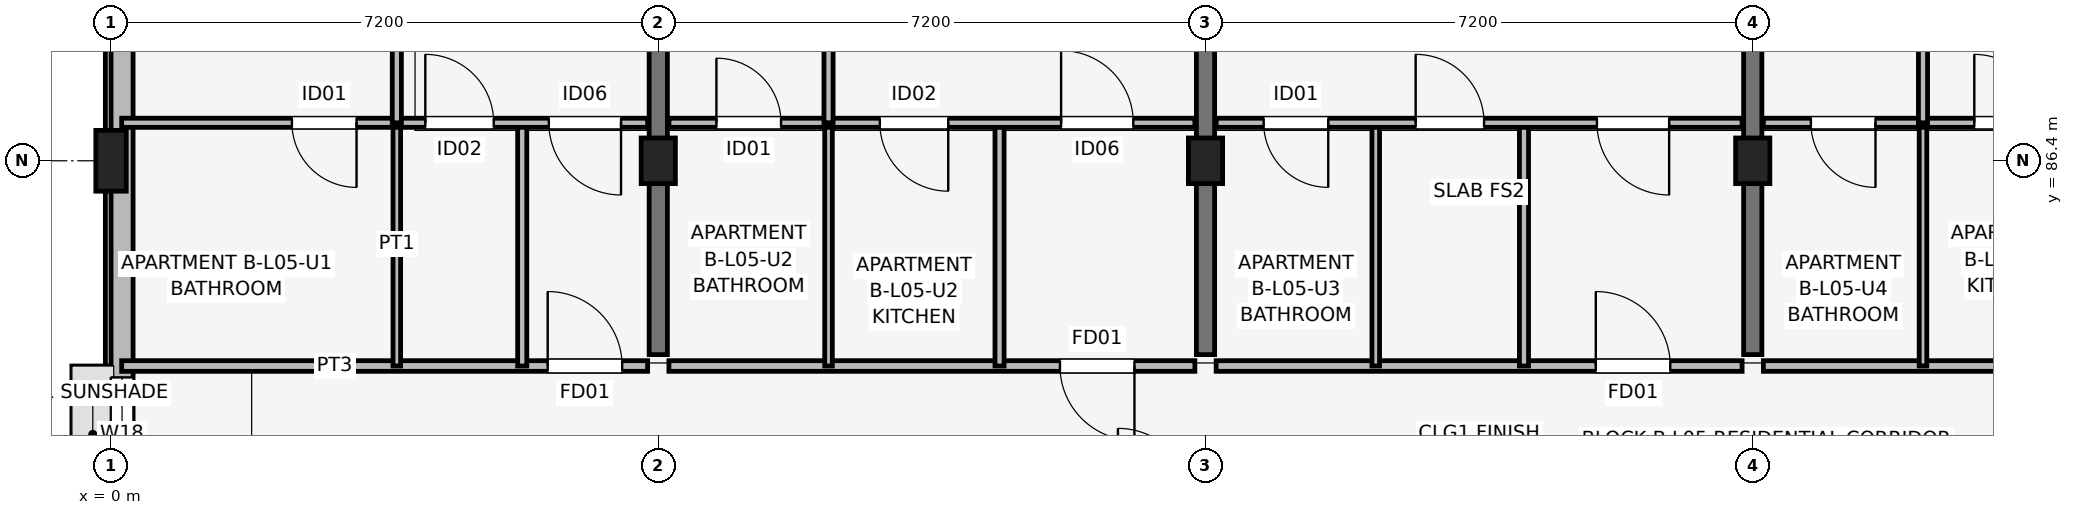
"""IFC4 building model, lengths in metres.
Left out: names, types, materials, properties, quantities, classifications, styles, units other than length and angle.
Written with IfcOpenShell. Run it as: python <this file> out.ifc"""

import sys

from ifc_helpers import new_model, si_unit, direction, frame, frame_2d, origin, origin_2d, place, context, subcontext, project, spatial, rectangle, extrude, element, fill, save


model = new_model("IFC4")
c1 = context("Model", 3, precision=1e-05, world=origin(), true_north=direction((0.0, 1.0)))
c2 = subcontext(c1, "Body", "Model", "MODEL_VIEW")
j1 = project(units=[si_unit("LENGTHUNIT", "METRE"), si_unit("PLANEANGLEUNIT", "RADIAN")], contexts=[c1])
p1 = place(None, origin())
s1 = spatial("IfcSite", under=j1, at=p1, CompositionType="ELEMENT")
p2 = place(p1, origin())
s2 = spatial("IfcBuilding", under=s1, at=p2, CompositionType="ELEMENT")
p3 = place(p2, frame((0.0, 0.0, 18.15)))
s3 = spatial("IfcBuildingStorey", under=s2, at=p3, CompositionType="ELEMENT", Elevation=18.15)
p4 = place(p3, frame((0.0, 86.4, 0.0), z_axis=(0.0, 0.0, 1.0), x_axis=(1.0, 0.0, 0.0)))
e1 = element("IfcColumn", 1, at=p4, inside=s3, PredefinedType="COLUMN", context=c2, shape_type="SweptSolid", body=[
    extrude(rectangle(XDim=0.4, YDim=0.8, at=origin_2d()), origin(), (0.0, 0.0, 1.0), 3.15),
])
for number, where, z_axis, x_axis in (
    (2, (7.2, 86.4, 0.0), (0.0, 0.0, 1.0), (1.0, 0.0, 0.0)),
    (3, (14.4, 86.4, 0.0), (0.0, 0.0, 1.0), (1.0, 0.0, 0.0)),
    (4, (21.6, 86.4, 0.0), (0.0, 0.0, 1.0), (1.0, 0.0, 0.0)),
):
    element("IfcColumn", number, at=place(p3, frame(where, z_axis=z_axis, x_axis=x_axis)), inside=s3, PredefinedType="COLUMN", context=c2, shape_type="SweptSolid", body=[
        extrude(rectangle(XDim=0.45, YDim=0.6, at=origin_2d()), origin(), (0.0, 0.0, 1.0), 3.15),
    ])
for number, where, z_axis, x_axis in (
    (5, (7.2, 83.85, 0.0), (0.0, 0.0, 1.0), (0.0, 1.0, 0.0)),
    (6, (14.4, 83.85, 0.0), (0.0, 0.0, 1.0), (0.0, 1.0, 0.0)),
    (7, (21.6, 83.85, 0.0), (0.0, 0.0, 1.0), (0.0, 1.0, 0.0)),
):
    element("IfcWall", number, at=place(p3, frame(where, z_axis=z_axis, x_axis=x_axis)), inside=s3, PredefinedType="SHEAR", context=c2, shape_type="SweptSolid", body=[
        extrude(rectangle(XDim=9.4, YDim=0.24, at=frame_2d((4.7, 0.0))), origin(), (0.0, 0.0, 1.0), 3.15),
    ])
p5 = place(p3, frame((0.145, 90.4, 0.0), z_axis=(0.0, 0.0, 1.0), x_axis=(0.0, -1.0, 0.0)))
e8 = element("IfcWall", 8, at=p5, inside=s3, PredefinedType="SOLIDWALL", context=c2, shape_type="SweptSolid", body=[
    extrude(rectangle(XDim=15.2, YDim=0.29, at=frame_2d((7.6, 0.0))), origin(), (0.0, 0.0, 1.0), 2.38),
])
p6 = place(p5, frame((6.85, 0.0, 1.05)))
e9 = element("IfcOpeningElement", 9, at=p6, cuts=e8, PredefinedType="OPENING", context=c2, shape_type="SweptSolid", body=[
    extrude(rectangle(XDim=1.5, YDim=1.15, at=frame_2d((0.75, 0.575))), frame((0.0, 0.155, 0.0), z_axis=(0.0, -1.0, 0.0), x_axis=(1.0, 0.0, 0.0)), (0.0, 0.0, 1.0), 0.31),
])
p7 = place(p5, frame((1.215, 0.0, 0.72)))
e10 = element("IfcOpeningElement", 10, at=p7, cuts=e8, PredefinedType="OPENING", context=c2, shape_type="SweptSolid", body=[
    extrude(rectangle(XDim=1.3, YDim=1.55, at=frame_2d((0.65, 0.775))), frame((0.0, 0.155, 0.0), z_axis=(0.0, -1.0, 0.0), x_axis=(1.0, 0.0, 0.0)), (0.0, 0.0, 1.0), 0.31),
])
p8 = place(p3, frame((0.14, 83.7, 0.0), z_axis=(0.0, 0.0, 1.0), x_axis=(1.0, 0.0, 0.0)))
e11 = element("IfcWall", 11, at=p8, inside=s3, PredefinedType="PARTITIONING", context=c2, shape_type="SweptSolid", body=[
    extrude(rectangle(XDim=6.92, YDim=0.14, at=frame_2d((3.46, 0.0))), origin(), (0.0, 0.0, 1.0), 2.38),
])
p9 = place(p8, frame((5.605, 0.0, 0.0)))
e12 = element("IfcOpeningElement", 12, at=p9, cuts=e11, PredefinedType="OPENING", context=c2, shape_type="SweptSolid", body=[
    extrude(rectangle(XDim=0.98, YDim=2.1, at=frame_2d((0.49, 1.05))), frame((0.0, 0.08, 0.0), z_axis=(0.0, -1.0, 0.0), x_axis=(1.0, 0.0, 0.0)), (0.0, 0.0, 1.0), 0.16),
])
p10 = place(p3, frame((3.76, 83.7, 0.0), z_axis=(0.0, 0.0, 1.0), x_axis=(0.0, 1.0, 0.0)))
e13 = element("IfcWall", 13, at=p10, inside=s3, PredefinedType="PARTITIONING", context=c2, shape_type="SweptSolid", body=[
    extrude(rectangle(XDim=3.2, YDim=0.1, at=frame_2d((1.6, 0.0))), origin(), (0.0, 0.0, 1.0), 2.375),
])
p11 = place(p3, frame((5.41, 83.7, 0.0), z_axis=(0.0, 0.0, 1.0), x_axis=(0.0, 1.0, 0.0)))
e14 = element("IfcWall", 14, at=p11, inside=s3, PredefinedType="PARTITIONING", context=c2, shape_type="SweptSolid", body=[
    extrude(rectangle(XDim=3.2, YDim=0.12, at=frame_2d((1.6, 0.0))), origin(), (0.0, 0.0, 1.0), 2.375),
])
p12 = place(p3, frame((0.14, 86.9, 0.0), z_axis=(0.0, 0.0, 1.0), x_axis=(1.0, 0.0, 0.0)))
e15 = element("IfcWall", 15, at=p12, inside=s3, PredefinedType="PARTITIONING", context=c2, shape_type="SweptSolid", body=[
    extrude(rectangle(XDim=6.92, YDim=0.12, at=frame_2d((3.46, 0.0))), origin(), (0.0, 0.0, 1.0), 2.38),
])
p13 = place(p12, frame((3.09, 0.0, 0.0), z_axis=(0.0, 0.0, 1.0), x_axis=(-1.0, 0.0, 0.0)))
e16 = element("IfcOpeningElement", 16, at=p13, cuts=e15, PredefinedType="OPENING", context=c2, shape_type="SweptSolid", body=[
    extrude(rectangle(XDim=0.85, YDim=2.08, at=frame_2d((0.425, 1.04))), frame((0.0, 0.07, 0.0), z_axis=(0.0, -1.0, 0.0), x_axis=(1.0, 0.0, 0.0)), (0.0, 0.0, 1.0), 0.14),
])
p14 = place(p12, frame((3.995, 0.0, 0.0)))
e17 = element("IfcOpeningElement", 17, at=p14, cuts=e15, PredefinedType="OPENING", context=c2, shape_type="SweptSolid", body=[
    extrude(rectangle(XDim=0.9, YDim=2.08, at=frame_2d((0.45, 1.04))), frame((0.0, 0.07, 0.0), z_axis=(0.0, -1.0, 0.0), x_axis=(1.0, 0.0, 0.0)), (0.0, 0.0, 1.0), 0.14),
])
p15 = place(p12, frame((6.57, 0.0, 0.0), z_axis=(0.0, 0.0, 1.0), x_axis=(-1.0, 0.0, 0.0)))
e18 = element("IfcOpeningElement", 18, at=p15, cuts=e15, PredefinedType="OPENING", context=c2, shape_type="SweptSolid", body=[
    extrude(rectangle(XDim=0.95, YDim=2.08, at=frame_2d((0.475, 1.04))), frame((0.0, 0.07, 0.0), z_axis=(0.0, -1.0, 0.0), x_axis=(1.0, 0.0, 0.0)), (0.0, 0.0, 1.0), 0.14),
])
p16 = place(p3, frame((3.76, 86.9, 0.0), z_axis=(0.0, 0.0, 1.0), x_axis=(0.0, 1.0, 0.0)))
e19 = element("IfcWall", 19, at=p16, inside=s3, PredefinedType="PARTITIONING", context=c2, shape_type="SweptSolid", body=[
    extrude(rectangle(XDim=6.4, YDim=0.12, at=frame_2d((3.2, 0.0))), origin(), (0.0, 0.0, 1.0), 2.38),
])
p17 = place(p16, frame((2.75, 0.0, 0.0)))
e20 = element("IfcOpeningElement", 20, at=p17, cuts=e19, PredefinedType="OPENING", context=c2, shape_type="SweptSolid", body=[
    extrude(rectangle(XDim=0.9, YDim=2.08, at=frame_2d((0.45, 1.04))), frame((0.0, 0.07, 0.0), z_axis=(0.0, -1.0, 0.0), x_axis=(1.0, 0.0, 0.0)), (0.0, 0.0, 1.0), 0.14),
])
p18 = place(p3, frame((7.34, 83.7, 0.0), z_axis=(0.0, 0.0, 1.0), x_axis=(1.0, 0.0, 0.0)))
e21 = element("IfcWall", 21, at=p18, inside=s3, PredefinedType="PARTITIONING", context=c2, shape_type="SweptSolid", body=[
    extrude(rectangle(XDim=6.92, YDim=0.14, at=frame_2d((3.46, 0.0))), origin(), (0.0, 0.0, 1.0), 2.38),
])
p19 = place(p18, frame((6.125, 0.0, 0.0), z_axis=(0.0, 0.0, 1.0), x_axis=(-1.0, 0.0, 0.0)))
e22 = element("IfcOpeningElement", 22, at=p19, cuts=e21, PredefinedType="OPENING", context=c2, shape_type="SweptSolid", body=[
    extrude(rectangle(XDim=0.98, YDim=2.1, at=frame_2d((0.49, 1.05))), frame((0.0, 0.08, 0.0), z_axis=(0.0, -1.0, 0.0), x_axis=(1.0, 0.0, 0.0)), (0.0, 0.0, 1.0), 0.16),
])
p20 = place(p3, frame((9.44, 83.7, 0.0), z_axis=(0.0, 0.0, 1.0), x_axis=(0.0, 1.0, 0.0)))
e23 = element("IfcWall", 23, at=p20, inside=s3, PredefinedType="PARTITIONING", context=c2, shape_type="SweptSolid", body=[
    extrude(rectangle(XDim=3.2, YDim=0.1, at=frame_2d((1.6, 0.0))), origin(), (0.0, 0.0, 1.0), 2.375),
])
p21 = place(p3, frame((11.69, 83.7, 0.0), z_axis=(0.0, 0.0, 1.0), x_axis=(0.0, 1.0, 0.0)))
e24 = element("IfcWall", 24, at=p21, inside=s3, PredefinedType="PARTITIONING", context=c2, shape_type="SweptSolid", body=[
    extrude(rectangle(XDim=3.2, YDim=0.12, at=frame_2d((1.6, 0.0))), origin(), (0.0, 0.0, 1.0), 2.375),
])
p22 = place(p3, frame((7.34, 86.9, 0.0), z_axis=(0.0, 0.0, 1.0), x_axis=(1.0, 0.0, 0.0)))
e25 = element("IfcWall", 25, at=p22, inside=s3, PredefinedType="PARTITIONING", context=c2, shape_type="SweptSolid", body=[
    extrude(rectangle(XDim=6.92, YDim=0.12, at=frame_2d((3.46, 0.0))), origin(), (0.0, 0.0, 1.0), 2.38),
])
p23 = place(p22, frame((0.625, 0.0, 0.0)))
e26 = element("IfcOpeningElement", 26, at=p23, cuts=e25, PredefinedType="OPENING", context=c2, shape_type="SweptSolid", body=[
    extrude(rectangle(XDim=0.85, YDim=2.08, at=frame_2d((0.425, 1.04))), frame((0.0, 0.07, 0.0), z_axis=(0.0, -1.0, 0.0), x_axis=(1.0, 0.0, 0.0)), (0.0, 0.0, 1.0), 0.14),
])
p24 = place(p22, frame((3.675, 0.0, 0.0), z_axis=(0.0, 0.0, 1.0), x_axis=(-1.0, 0.0, 0.0)))
e27 = element("IfcOpeningElement", 27, at=p24, cuts=e25, PredefinedType="OPENING", context=c2, shape_type="SweptSolid", body=[
    extrude(rectangle(XDim=0.9, YDim=2.08, at=frame_2d((0.45, 1.04))), frame((0.0, 0.07, 0.0), z_axis=(0.0, -1.0, 0.0), x_axis=(1.0, 0.0, 0.0)), (0.0, 0.0, 1.0), 0.14),
])
p25 = place(p22, frame((5.16, 0.0, 0.0)))
e28 = element("IfcOpeningElement", 28, at=p25, cuts=e25, PredefinedType="OPENING", context=c2, shape_type="SweptSolid", body=[
    extrude(rectangle(XDim=0.95, YDim=2.08, at=frame_2d((0.475, 1.04))), frame((0.0, 0.07, 0.0), z_axis=(0.0, -1.0, 0.0), x_axis=(1.0, 0.0, 0.0)), (0.0, 0.0, 1.0), 0.14),
])
p26 = place(p3, frame((9.44, 86.9, 0.0), z_axis=(0.0, 0.0, 1.0), x_axis=(0.0, 1.0, 0.0)))
e29 = element("IfcWall", 29, at=p26, inside=s3, PredefinedType="PARTITIONING", context=c2, shape_type="SweptSolid", body=[
    extrude(rectangle(XDim=6.4, YDim=0.12, at=frame_2d((3.2, 0.0))), origin(), (0.0, 0.0, 1.0), 2.38),
])
p27 = place(p26, frame((3.65, 0.0, 0.0), z_axis=(0.0, 0.0, 1.0), x_axis=(-1.0, 0.0, 0.0)))
e30 = element("IfcOpeningElement", 30, at=p27, cuts=e29, PredefinedType="OPENING", context=c2, shape_type="SweptSolid", body=[
    extrude(rectangle(XDim=0.9, YDim=2.08, at=frame_2d((0.45, 1.04))), frame((0.0, 0.07, 0.0), z_axis=(0.0, -1.0, 0.0), x_axis=(1.0, 0.0, 0.0)), (0.0, 0.0, 1.0), 0.14),
])
p28 = place(p3, frame((14.54, 83.7, 0.0), z_axis=(0.0, 0.0, 1.0), x_axis=(1.0, 0.0, 0.0)))
e31 = element("IfcWall", 31, at=p28, inside=s3, PredefinedType="PARTITIONING", context=c2, shape_type="SweptSolid", body=[
    extrude(rectangle(XDim=6.92, YDim=0.14, at=frame_2d((3.46, 0.0))), origin(), (0.0, 0.0, 1.0), 2.38),
])
p29 = place(p28, frame((4.995, 0.0, 0.0)))
e32 = element("IfcOpeningElement", 32, at=p29, cuts=e31, PredefinedType="OPENING", context=c2, shape_type="SweptSolid", body=[
    extrude(rectangle(XDim=0.98, YDim=2.1, at=frame_2d((0.49, 1.05))), frame((0.0, 0.08, 0.0), z_axis=(0.0, -1.0, 0.0), x_axis=(1.0, 0.0, 0.0)), (0.0, 0.0, 1.0), 0.16),
])
p30 = place(p3, frame((16.64, 83.7, 0.0), z_axis=(0.0, 0.0, 1.0), x_axis=(0.0, 1.0, 0.0)))
e33 = element("IfcWall", 33, at=p30, inside=s3, PredefinedType="PARTITIONING", context=c2, shape_type="SweptSolid", body=[
    extrude(rectangle(XDim=3.2, YDim=0.1, at=frame_2d((1.6, 0.0))), origin(), (0.0, 0.0, 1.0), 2.375),
])
p31 = place(p3, frame((18.59, 83.7, 0.0), z_axis=(0.0, 0.0, 1.0), x_axis=(0.0, 1.0, 0.0)))
e34 = element("IfcWall", 34, at=p31, inside=s3, PredefinedType="PARTITIONING", context=c2, shape_type="SweptSolid", body=[
    extrude(rectangle(XDim=3.2, YDim=0.12, at=frame_2d((1.6, 0.0))), origin(), (0.0, 0.0, 1.0), 2.375),
])
p32 = place(p3, frame((14.54, 86.9, 0.0), z_axis=(0.0, 0.0, 1.0), x_axis=(1.0, 0.0, 0.0)))
e35 = element("IfcWall", 35, at=p32, inside=s3, PredefinedType="PARTITIONING", context=c2, shape_type="SweptSolid", body=[
    extrude(rectangle(XDim=6.92, YDim=0.12, at=frame_2d((3.46, 0.0))), origin(), (0.0, 0.0, 1.0), 2.38),
])
p33 = place(p32, frame((1.475, 0.0, 0.0), z_axis=(0.0, 0.0, 1.0), x_axis=(-1.0, 0.0, 0.0)))
e36 = element("IfcOpeningElement", 36, at=p33, cuts=e35, PredefinedType="OPENING", context=c2, shape_type="SweptSolid", body=[
    extrude(rectangle(XDim=0.85, YDim=2.08, at=frame_2d((0.425, 1.04))), frame((0.0, 0.07, 0.0), z_axis=(0.0, -1.0, 0.0), x_axis=(1.0, 0.0, 0.0)), (0.0, 0.0, 1.0), 0.14),
])
p34 = place(p32, frame((2.625, 0.0, 0.0)))
e37 = element("IfcOpeningElement", 37, at=p34, cuts=e35, PredefinedType="OPENING", context=c2, shape_type="SweptSolid", body=[
    extrude(rectangle(XDim=0.9, YDim=2.08, at=frame_2d((0.45, 1.04))), frame((0.0, 0.07, 0.0), z_axis=(0.0, -1.0, 0.0), x_axis=(1.0, 0.0, 0.0)), (0.0, 0.0, 1.0), 0.14),
])
p35 = place(p32, frame((5.96, 0.0, 0.0), z_axis=(0.0, 0.0, 1.0), x_axis=(-1.0, 0.0, 0.0)))
e38 = element("IfcOpeningElement", 38, at=p35, cuts=e35, PredefinedType="OPENING", context=c2, shape_type="SweptSolid", body=[
    extrude(rectangle(XDim=0.95, YDim=2.08, at=frame_2d((0.475, 1.04))), frame((0.0, 0.07, 0.0), z_axis=(0.0, -1.0, 0.0), x_axis=(1.0, 0.0, 0.0)), (0.0, 0.0, 1.0), 0.14),
])
p36 = place(p3, frame((21.74, 83.7, 0.0), z_axis=(0.0, 0.0, 1.0), x_axis=(1.0, 0.0, 0.0)))
e39 = element("IfcWall", 39, at=p36, inside=s3, PredefinedType="PARTITIONING", context=c2, shape_type="SweptSolid", body=[
    extrude(rectangle(XDim=6.92, YDim=0.14, at=frame_2d((3.46, 0.0))), origin(), (0.0, 0.0, 1.0), 2.38),
])
p37 = place(p36, frame((5.145, 0.0, 0.0)))
e40 = element("IfcOpeningElement", 40, at=p37, cuts=e39, PredefinedType="OPENING", context=c2, shape_type="SweptSolid", body=[
    extrude(rectangle(XDim=0.98, YDim=2.1, at=frame_2d((0.49, 1.05))), frame((0.0, 0.08, 0.0), z_axis=(0.0, -1.0, 0.0), x_axis=(1.0, 0.0, 0.0)), (0.0, 0.0, 1.0), 0.16),
])
p38 = place(p3, frame((23.84, 83.7, 0.0), z_axis=(0.0, 0.0, 1.0), x_axis=(0.0, 1.0, 0.0)))
e41 = element("IfcWall", 41, at=p38, inside=s3, PredefinedType="PARTITIONING", context=c2, shape_type="SweptSolid", body=[
    extrude(rectangle(XDim=3.2, YDim=0.1, at=frame_2d((1.6, 0.0))), origin(), (0.0, 0.0, 1.0), 2.375),
])
p39 = place(p3, frame((21.74, 86.9, 0.0), z_axis=(0.0, 0.0, 1.0), x_axis=(1.0, 0.0, 0.0)))
e42 = element("IfcWall", 42, at=p39, inside=s3, PredefinedType="PARTITIONING", context=c2, shape_type="SweptSolid", body=[
    extrude(rectangle(XDim=6.92, YDim=0.12, at=frame_2d((3.46, 0.0))), origin(), (0.0, 0.0, 1.0), 2.38),
])
p40 = place(p39, frame((1.475, 0.0, 0.0), z_axis=(0.0, 0.0, 1.0), x_axis=(-1.0, 0.0, 0.0)))
e43 = element("IfcOpeningElement", 43, at=p40, cuts=e42, PredefinedType="OPENING", context=c2, shape_type="SweptSolid", body=[
    extrude(rectangle(XDim=0.85, YDim=2.08, at=frame_2d((0.425, 1.04))), frame((0.0, 0.07, 0.0), z_axis=(0.0, -1.0, 0.0), x_axis=(1.0, 0.0, 0.0)), (0.0, 0.0, 1.0), 0.14),
])
p41 = place(p39, frame((2.775, 0.0, 0.0)))
e44 = element("IfcOpeningElement", 44, at=p41, cuts=e42, PredefinedType="OPENING", context=c2, shape_type="SweptSolid", body=[
    extrude(rectangle(XDim=0.9, YDim=2.08, at=frame_2d((0.45, 1.04))), frame((0.0, 0.07, 0.0), z_axis=(0.0, -1.0, 0.0), x_axis=(1.0, 0.0, 0.0)), (0.0, 0.0, 1.0), 0.14),
])
p42 = place(p39, frame((6.11, 0.0, 0.0), z_axis=(0.0, 0.0, 1.0), x_axis=(-1.0, 0.0, 0.0)))
e45 = element("IfcOpeningElement", 45, at=p42, cuts=e42, PredefinedType="OPENING", context=c2, shape_type="SweptSolid", body=[
    extrude(rectangle(XDim=0.95, YDim=2.08, at=frame_2d((0.475, 1.04))), frame((0.0, 0.07, 0.0), z_axis=(0.0, -1.0, 0.0), x_axis=(1.0, 0.0, 0.0)), (0.0, 0.0, 1.0), 0.14),
])
p43 = place(p3, frame((23.84, 86.9, 0.0), z_axis=(0.0, 0.0, 1.0), x_axis=(0.0, 1.0, 0.0)))
e46 = element("IfcWall", 46, at=p43, inside=s3, PredefinedType="PARTITIONING", context=c2, shape_type="SweptSolid", body=[
    extrude(rectangle(XDim=6.4, YDim=0.12, at=frame_2d((3.2, 0.0))), origin(), (0.0, 0.0, 1.0), 2.38),
])
p44 = place(p43, frame((2.75, 0.0, 0.0)))
e47 = element("IfcOpeningElement", 47, at=p44, cuts=e46, PredefinedType="OPENING", context=c2, shape_type="SweptSolid", body=[
    extrude(rectangle(XDim=0.9, YDim=2.08, at=frame_2d((0.45, 1.04))), frame((0.0, 0.07, 0.0), z_axis=(0.0, -1.0, 0.0), x_axis=(1.0, 0.0, 0.0)), (0.0, 0.0, 1.0), 0.14),
])
p45 = place(p6, origin())
e48 = element("IfcWindow", 48, at=p45, inside=s3, PartitioningType="SINGLE_PANEL", PredefinedType="WINDOW", context=c2, shape_type="SweptSolid", body=[
    extrude(rectangle(XDim=1.5, YDim=1.15, at=frame_2d((0.75, 0.575))), frame((0.0, 0.03, 0.0), z_axis=(0.0, -1.0, 0.0), x_axis=(1.0, 0.0, 0.0)), (0.0, 0.0, 1.0), 0.06),
])
fill(e9, e48)
p46 = place(p9, origin())
e49 = element("IfcDoor", 49, at=p46, inside=s3, OperationType="SINGLE_SWING_LEFT", PredefinedType="DOOR", context=c2, shape_type="SweptSolid", body=[
    extrude(rectangle(XDim=0.98, YDim=2.1, at=frame_2d((0.49, 1.05))), frame((0.0, 0.025, 0.0), z_axis=(0.0, -1.0, 0.0), x_axis=(1.0, 0.0, 0.0)), (0.0, 0.0, 1.0), 0.05),
])
fill(e12, e49)
p47 = place(p13, origin())
e50 = element("IfcDoor", 50, at=p47, inside=s3, OperationType="SINGLE_SWING_RIGHT", PredefinedType="DOOR", context=c2, shape_type="SweptSolid", body=[
    extrude(rectangle(XDim=0.85, YDim=2.08, at=frame_2d((0.425, 1.04))), frame((0.0, 0.025, 0.0), z_axis=(0.0, -1.0, 0.0), x_axis=(1.0, 0.0, 0.0)), (0.0, 0.0, 1.0), 0.05),
])
fill(e16, e50)
p48 = place(p14, origin())
e51 = element("IfcDoor", 51, at=p48, inside=s3, OperationType="SINGLE_SWING_LEFT", PredefinedType="DOOR", context=c2, shape_type="SweptSolid", body=[
    extrude(rectangle(XDim=0.9, YDim=2.08, at=frame_2d((0.45, 1.04))), frame((0.0, 0.025, 0.0), z_axis=(0.0, -1.0, 0.0), x_axis=(1.0, 0.0, 0.0)), (0.0, 0.0, 1.0), 0.05),
])
fill(e17, e51)
p49 = place(p15, origin())
e52 = element("IfcDoor", 52, at=p49, inside=s3, OperationType="SINGLE_SWING_RIGHT", PredefinedType="DOOR", context=c2, shape_type="SweptSolid", body=[
    extrude(rectangle(XDim=0.95, YDim=2.08, at=frame_2d((0.475, 1.04))), frame((0.0, 0.025, 0.0), z_axis=(0.0, -1.0, 0.0), x_axis=(1.0, 0.0, 0.0)), (0.0, 0.0, 1.0), 0.05),
])
fill(e18, e52)
p50 = place(p19, origin())
e53 = element("IfcDoor", 53, at=p50, inside=s3, OperationType="SINGLE_SWING_RIGHT", PredefinedType="DOOR", context=c2, shape_type="SweptSolid", body=[
    extrude(rectangle(XDim=0.98, YDim=2.1, at=frame_2d((0.49, 1.05))), frame((0.0, 0.025, 0.0), z_axis=(0.0, -1.0, 0.0), x_axis=(1.0, 0.0, 0.0)), (0.0, 0.0, 1.0), 0.05),
])
fill(e22, e53)
p51 = place(p23, origin())
e54 = element("IfcDoor", 54, at=p51, inside=s3, OperationType="SINGLE_SWING_LEFT", PredefinedType="DOOR", context=c2, shape_type="SweptSolid", body=[
    extrude(rectangle(XDim=0.85, YDim=2.08, at=frame_2d((0.425, 1.04))), frame((0.0, 0.025, 0.0), z_axis=(0.0, -1.0, 0.0), x_axis=(1.0, 0.0, 0.0)), (0.0, 0.0, 1.0), 0.05),
])
fill(e26, e54)
p52 = place(p24, origin())
e55 = element("IfcDoor", 55, at=p52, inside=s3, OperationType="SINGLE_SWING_RIGHT", PredefinedType="DOOR", context=c2, shape_type="SweptSolid", body=[
    extrude(rectangle(XDim=0.9, YDim=2.08, at=frame_2d((0.45, 1.04))), frame((0.0, 0.025, 0.0), z_axis=(0.0, -1.0, 0.0), x_axis=(1.0, 0.0, 0.0)), (0.0, 0.0, 1.0), 0.05),
])
fill(e27, e55)
p53 = place(p25, origin())
e56 = element("IfcDoor", 56, at=p53, inside=s3, OperationType="SINGLE_SWING_LEFT", PredefinedType="DOOR", context=c2, shape_type="SweptSolid", body=[
    extrude(rectangle(XDim=0.95, YDim=2.08, at=frame_2d((0.475, 1.04))), frame((0.0, 0.025, 0.0), z_axis=(0.0, -1.0, 0.0), x_axis=(1.0, 0.0, 0.0)), (0.0, 0.0, 1.0), 0.05),
])
fill(e28, e56)
p54 = place(p29, origin())
e57 = element("IfcDoor", 57, at=p54, inside=s3, OperationType="SINGLE_SWING_LEFT", PredefinedType="DOOR", context=c2, shape_type="SweptSolid", body=[
    extrude(rectangle(XDim=0.98, YDim=2.1, at=frame_2d((0.49, 1.05))), frame((0.0, 0.025, 0.0), z_axis=(0.0, -1.0, 0.0), x_axis=(1.0, 0.0, 0.0)), (0.0, 0.0, 1.0), 0.05),
])
fill(e32, e57)
p55 = place(p33, origin())
e58 = element("IfcDoor", 58, at=p55, inside=s3, OperationType="SINGLE_SWING_RIGHT", PredefinedType="DOOR", context=c2, shape_type="SweptSolid", body=[
    extrude(rectangle(XDim=0.85, YDim=2.08, at=frame_2d((0.425, 1.04))), frame((0.0, 0.025, 0.0), z_axis=(0.0, -1.0, 0.0), x_axis=(1.0, 0.0, 0.0)), (0.0, 0.0, 1.0), 0.05),
])
fill(e36, e58)
p56 = place(p34, origin())
e59 = element("IfcDoor", 59, at=p56, inside=s3, OperationType="SINGLE_SWING_LEFT", PredefinedType="DOOR", context=c2, shape_type="SweptSolid", body=[
    extrude(rectangle(XDim=0.9, YDim=2.08, at=frame_2d((0.45, 1.04))), frame((0.0, 0.025, 0.0), z_axis=(0.0, -1.0, 0.0), x_axis=(1.0, 0.0, 0.0)), (0.0, 0.0, 1.0), 0.05),
])
fill(e37, e59)
p57 = place(p35, origin())
e60 = element("IfcDoor", 60, at=p57, inside=s3, OperationType="SINGLE_SWING_RIGHT", PredefinedType="DOOR", context=c2, shape_type="SweptSolid", body=[
    extrude(rectangle(XDim=0.95, YDim=2.08, at=frame_2d((0.475, 1.04))), frame((0.0, 0.025, 0.0), z_axis=(0.0, -1.0, 0.0), x_axis=(1.0, 0.0, 0.0)), (0.0, 0.0, 1.0), 0.05),
])
fill(e38, e60)
p58 = place(p40, origin())
e61 = element("IfcDoor", 61, at=p58, inside=s3, OperationType="SINGLE_SWING_RIGHT", PredefinedType="DOOR", context=c2, shape_type="SweptSolid", body=[
    extrude(rectangle(XDim=0.85, YDim=2.08, at=frame_2d((0.425, 1.04))), frame((0.0, 0.025, 0.0), z_axis=(0.0, -1.0, 0.0), x_axis=(1.0, 0.0, 0.0)), (0.0, 0.0, 1.0), 0.05),
])
fill(e43, e61)
p59 = place(p41, origin())
e62 = element("IfcDoor", 62, at=p59, inside=s3, OperationType="SINGLE_SWING_LEFT", PredefinedType="DOOR", context=c2, shape_type="SweptSolid", body=[
    extrude(rectangle(XDim=0.9, YDim=2.08, at=frame_2d((0.45, 1.04))), frame((0.0, 0.025, 0.0), z_axis=(0.0, -1.0, 0.0), x_axis=(1.0, 0.0, 0.0)), (0.0, 0.0, 1.0), 0.05),
])
fill(e44, e62)
save(model, sys.argv[1])
